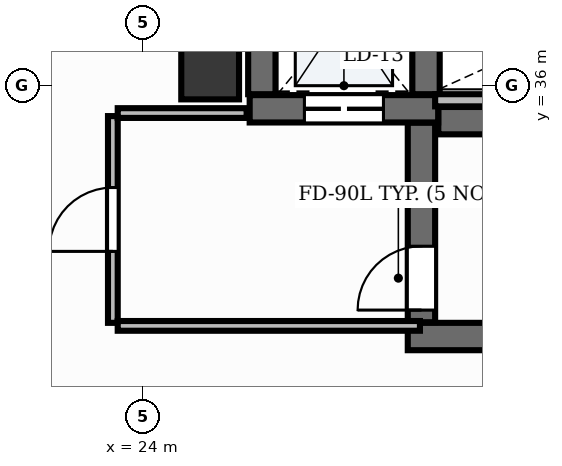
"""IFC4 building model, lengths in metres.
Left out: names, types, materials, properties, quantities, classifications, styles, units other than length and angle.
Written with IfcOpenShell. Run it as: python <this file> out.ifc"""

import sys

from ifc_helpers import new_model, si_unit, direction, frame, frame_2d, origin, origin_2d, place, context, subcontext, project, spatial, rectangle, extrude, element, fill, save


model = new_model("IFC4")
c1 = context("Model", 3, precision=1e-05, world=origin(), true_north=direction((0.0, 1.0)))
c2 = subcontext(c1, "Body", "Model", "MODEL_VIEW")
j1 = project(units=[si_unit("LENGTHUNIT", "METRE"), si_unit("PLANEANGLEUNIT", "RADIAN")], contexts=[c1])
p1 = place(None, origin())
s1 = spatial("IfcSite", under=j1, at=p1, CompositionType="ELEMENT")
p2 = place(p1, origin())
s2 = spatial("IfcBuilding", under=s1, at=p2, CompositionType="ELEMENT")
p3 = place(p2, frame((0.0, 0.0, 20.4)))
s3 = spatial("IfcBuildingStorey", under=s2, at=p3, CompositionType="ELEMENT", Elevation=20.4)
p4 = place(p3, frame((28.852, 35.425, 0.0), z_axis=(0.0, 0.0, 1.0), x_axis=(1.0, 0.0, 0.0)))
e1 = element("IfcWall", 1, at=p4, inside=s3, PredefinedType="SHEAR", context=c2, shape_type="SweptSolid", body=[
    extrude(rectangle(XDim=8.248, YDim=0.45, at=frame_2d((4.124, 0.0))), origin(), (0.0, 0.0, 1.0), 5.1),
])
p5 = place(p3, frame((28.35, 31.875, 0.0), z_axis=(0.0, 0.0, 1.0), x_axis=(1.0, 0.0, 0.0)))
e2 = element("IfcWall", 2, at=p5, inside=s3, PredefinedType="SHEAR", context=c2, shape_type="SweptSolid", body=[
    extrude(rectangle(XDim=8.75, YDim=0.45, at=frame_2d((4.375, 0.0))), origin(), (0.0, 0.0, 1.0), 5.1),
])
p6 = place(p3, frame((28.575, 32.11, 0.0), z_axis=(0.0, 0.0, 1.0), x_axis=(0.0, 1.0, 0.0)))
e3 = element("IfcWall", 3, at=p6, inside=s3, PredefinedType="SHEAR", context=c2, shape_type="SweptSolid", body=[
    extrude(rectangle(XDim=3.283, YDim=0.45, at=frame_2d((1.642, 0.0))), origin(), (0.0, 0.0, 1.0), 5.1),
])
p7 = place(p6, frame((0.2, 0.0, 0.0)))
e4 = element("IfcOpeningElement", 4, at=p7, cuts=e3, PredefinedType="OPENING", context=c2, shape_type="SweptSolid", body=[
    extrude(rectangle(XDim=1.05, YDim=2.15, at=frame_2d((0.525, 1.075))), frame((0.0, 0.24, 0.0), z_axis=(0.0, -1.0, 0.0), x_axis=(1.0, 0.0, 0.0)), (0.0, 0.0, 1.0), 0.48),
])
p8 = place(p3, frame((25.75, 35.62, 0.0), z_axis=(0.0, 0.0, 1.0), x_axis=(1.0, 0.0, 0.0)))
e5 = element("IfcWall", 5, at=p8, inside=s3, PredefinedType="SHEAR", context=c2, shape_type="SweptSolid", body=[
    extrude(rectangle(XDim=3.1, YDim=0.45, at=frame_2d((1.55, 0.0))), origin(), (0.0, 0.0, 1.0), 5.1),
])
p9 = place(p8, frame((0.9, 0.0, 0.0)))
e6 = element("IfcOpeningElement", 6, at=p9, cuts=e5, PredefinedType="OPENING", context=c2, shape_type="SweptSolid", body=[
    extrude(rectangle(XDim=1.3, YDim=2.2, at=frame_2d((0.65, 1.1))), frame((0.0, 0.24, 0.0), z_axis=(0.0, -1.0, 0.0), x_axis=(1.0, 0.0, 0.0)), (0.0, 0.0, 1.0), 0.48),
])
for number, where, z_axis, x_axis in (
    (7, (25.95, 35.86, 0.0), (0.0, 0.0, 1.0), (0.0, 1.0, 0.0)),
    (8, (28.65, 35.86, 0.0), (0.0, 0.0, 1.0), (0.0, 1.0, 0.0)),
):
    element("IfcWall", number, at=place(p3, frame(where, z_axis=z_axis, x_axis=x_axis)), inside=s3, PredefinedType="SHEAR", context=c2, shape_type="SweptSolid", body=[
        extrude(rectangle(XDim=2.7, YDim=0.45, at=frame_2d((1.35, 0.0))), origin(), (0.0, 0.0, 1.0), 5.1),
    ])
p10 = place(p3, frame((25.1, 36.25, -0.0), z_axis=(0.0, 0.0, 1.0), x_axis=(1.0, 0.0, 0.0)))
e9 = element("IfcColumn", 9, at=p10, inside=s3, PredefinedType="PILASTER", context=c2, shape_type="SweptSolid", body=[
    extrude(rectangle(XDim=0.95, YDim=0.95, at=origin_2d()), origin(), (0.0, 0.0, 1.0), 5.101),
])
p11 = place(p3, frame((28.8, 35.76, 0.0), z_axis=(0.0, 0.0, 1.0), x_axis=(1.0, 0.0, 0.0)))
e10 = element("IfcWall", 10, at=p11, inside=s3, PredefinedType="PARTITIONING", context=c2, shape_type="SweptSolid", body=[
    extrude(rectangle(XDim=4.57, YDim=0.2, at=frame_2d((2.285, 0.0))), origin(), (0.0, 0.0, 1.0), 4.11),
])
p12 = place(p3, frame((23.5, 32.1, 0.0), z_axis=(0.0, 0.0, 1.0), x_axis=(0.0, 1.0, 0.0)))
e11 = element("IfcWall", 11, at=p12, inside=s3, PredefinedType="PARTITIONING", context=c2, shape_type="SweptSolid", body=[
    extrude(rectangle(XDim=3.4, YDim=0.16, at=frame_2d((1.7, 0.0))), origin(), (0.0, 0.0, 1.0), 4.11),
])
p13 = place(p12, frame((1.175, 0.0, 0.0)))
e12 = element("IfcOpeningElement", 12, at=p13, cuts=e11, PredefinedType="OPENING", context=c2, shape_type="SweptSolid", body=[
    extrude(rectangle(XDim=1.05, YDim=2.15, at=frame_2d((0.525, 1.075))), frame((0.0, 0.095, 0.0), z_axis=(0.0, -1.0, 0.0), x_axis=(1.0, 0.0, 0.0)), (0.0, 0.0, 1.0), 0.19),
])
p14 = place(p3, frame((23.58, 32.05, 0.0), z_axis=(0.0, 0.0, 1.0), x_axis=(1.0, 0.0, 0.0)))
e13 = element("IfcWall", 13, at=p14, inside=s3, PredefinedType="PARTITIONING", context=c2, shape_type="SweptSolid", body=[
    extrude(rectangle(XDim=4.97, YDim=0.16, at=frame_2d((2.485, 0.0))), origin(), (0.0, 0.0, 1.0), 4.11),
])
p15 = place(p3, frame((23.58, 35.55, 0.0), z_axis=(0.0, 0.0, 1.0), x_axis=(1.0, 0.0, 0.0)))
e14 = element("IfcWall", 14, at=p15, inside=s3, PredefinedType="PARTITIONING", context=c2, shape_type="SweptSolid", body=[
    extrude(rectangle(XDim=2.12, YDim=0.16, at=frame_2d((1.06, 0.0))), origin(), (0.0, 0.0, 1.0), 4.11),
])
p16 = place(p7, origin())
e15 = element("IfcDoor", 15, at=p16, inside=s3, OperationType="SINGLE_SWING_LEFT", PredefinedType="DOOR", context=c2, shape_type="SweptSolid", body=[
    extrude(rectangle(XDim=1.05, YDim=2.15, at=frame_2d((0.525, 1.075))), frame((0.0, 0.025, 0.0), z_axis=(0.0, -1.0, 0.0), x_axis=(1.0, 0.0, 0.0)), (0.0, 0.0, 1.0), 0.05),
])
fill(e4, e15)
p17 = place(p9, origin())
e16 = element("IfcDoor", 16, at=p17, inside=s3, OperationType="DOUBLE_DOOR_SLIDING", PredefinedType="DOOR", context=c2, shape_type="SweptSolid", body=[
    extrude(rectangle(XDim=1.3, YDim=2.2, at=frame_2d((0.65, 1.1))), frame((0.0, 0.025, 0.0), z_axis=(0.0, -1.0, 0.0), x_axis=(1.0, 0.0, 0.0)), (0.0, 0.0, 1.0), 0.05),
])
fill(e6, e16)
p18 = place(p13, origin())
e17 = element("IfcDoor", 17, at=p18, inside=s3, OperationType="SINGLE_SWING_LEFT", PredefinedType="DOOR", context=c2, shape_type="SweptSolid", body=[
    extrude(rectangle(XDim=1.05, YDim=2.15, at=frame_2d((0.525, 1.075))), frame((0.0, 0.025, 0.0), z_axis=(0.0, -1.0, 0.0), x_axis=(1.0, 0.0, 0.0)), (0.0, 0.0, 1.0), 0.05),
])
fill(e12, e17)
save(model, sys.argv[1])
